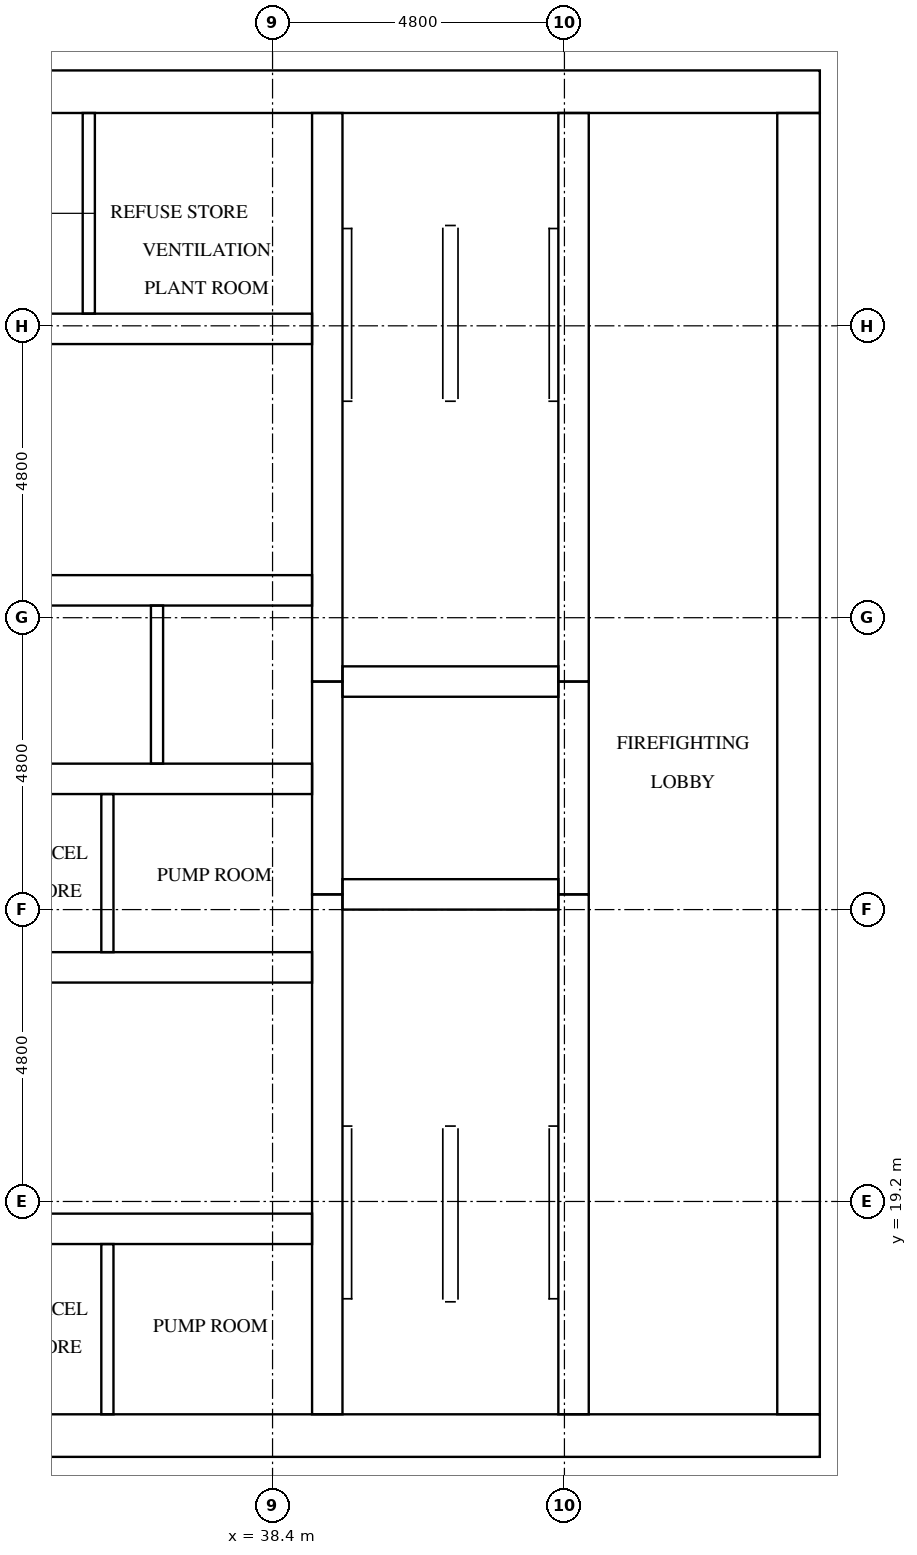
"""IFC4 building model, lengths in metres.
Left out: names, types, materials, properties, quantities, classifications, styles, units other than length and angle.
Written with IfcOpenShell. Run it as: python <this file> out.ifc"""

import sys

from ifc_helpers import new_model, si_unit, direction, frame, frame_2d, origin, place, context, subcontext, project, spatial, rectangle, extrude, element, fill, save


model = new_model("IFC4")
c1 = context("Model", 3, precision=1e-05, world=origin(), true_north=direction((0.0, 1.0)))
c2 = subcontext(c1, "Body", "Model", "MODEL_VIEW")
j1 = project(units=[si_unit("LENGTHUNIT", "METRE"), si_unit("PLANEANGLEUNIT", "RADIAN")], contexts=[c1])
p1 = place(None, origin())
s1 = spatial("IfcSite", under=j1, at=p1, CompositionType="ELEMENT")
p2 = place(p1, origin())
s2 = spatial("IfcBuilding", under=s1, at=p2, CompositionType="ELEMENT")
p3 = place(p2, frame((0.0, 0.0, 178.9)))
s3 = spatial("IfcBuildingStorey", under=s2, at=p3, CompositionType="ELEMENT", Elevation=178.9)
p4 = place(p3, frame((15.0, 15.35, 0.0), z_axis=(0.0, 0.0, 1.0), x_axis=(1.0, 0.0, 0.0)))
e1 = element("IfcWall", 1, at=p4, inside=s3, PredefinedType="SHEAR", context=c2, shape_type="SweptSolid", body=[
    extrude(rectangle(XDim=32.4, YDim=0.7, at=frame_2d((16.2, 0.0))), origin(), (0.0, 0.0, 1.0), 3.2),
])
p5 = place(p4, frame((15.3, 0.0, 0.0)))
e2 = element("IfcOpeningElement", 2, at=p5, cuts=e1, PredefinedType="OPENING", context=c2, shape_type="SweptSolid", body=[
    extrude(rectangle(XDim=1.8, YDim=2.1, at=frame_2d((0.9, 1.05))), frame((0.0, 0.36, 0.0), z_axis=(0.0, -1.0, 0.0), x_axis=(1.0, 0.0, 0.0)), (0.0, 0.0, 1.0), 0.72),
])
p6 = place(p3, frame((15.0, 37.45, 0.0), z_axis=(0.0, 0.0, 1.0), x_axis=(1.0, 0.0, 0.0)))
e3 = element("IfcWall", 3, at=p6, inside=s3, PredefinedType="SHEAR", context=c2, shape_type="SweptSolid", body=[
    extrude(rectangle(XDim=32.4, YDim=0.7, at=frame_2d((16.2, 0.0))), origin(), (0.0, 0.0, 1.0), 3.2),
])
p7 = place(p6, frame((15.3, 0.0, 0.0)))
e4 = element("IfcOpeningElement", 4, at=p7, cuts=e3, PredefinedType="OPENING", context=c2, shape_type="SweptSolid", body=[
    extrude(rectangle(XDim=1.8, YDim=2.1, at=frame_2d((0.9, 1.05))), frame((0.0, 0.36, 0.0), z_axis=(0.0, -1.0, 0.0), x_axis=(1.0, 0.0, 0.0)), (0.0, 0.0, 1.0), 0.72),
])
p8 = place(p6, frame((1.544, 0.0, 0.0)))
e5 = element("IfcOpeningElement", 5, at=p8, cuts=e3, PredefinedType="OPENING", context=c2, shape_type="SweptSolid", body=[
    extrude(rectangle(XDim=1.0, YDim=2.1, at=frame_2d((0.5, 1.05))), frame((0.0, 0.36, 0.0), z_axis=(0.0, -1.0, 0.0), x_axis=(1.0, 0.0, 0.0)), (0.0, 0.0, 1.0), 0.72),
])
p9 = place(p6, frame((5.219, 0.0, 0.0)))
e6 = element("IfcOpeningElement", 6, at=p9, cuts=e3, PredefinedType="OPENING", context=c2, shape_type="SweptSolid", body=[
    extrude(rectangle(XDim=1.0, YDim=2.1, at=frame_2d((0.5, 1.05))), frame((0.0, 0.36, 0.0), z_axis=(0.0, -1.0, 0.0), x_axis=(1.0, 0.0, 0.0)), (0.0, 0.0, 1.0), 0.72),
])
p10 = place(p3, frame((47.05, 15.7, 0.0), z_axis=(0.0, 0.0, 1.0), x_axis=(0.0, 1.0, 0.0)))
e7 = element("IfcWall", 7, at=p10, inside=s3, PredefinedType="SHEAR", context=c2, shape_type="SweptSolid", body=[
    extrude(rectangle(XDim=21.4, YDim=0.7, at=frame_2d((10.7, 0.0))), origin(), (0.0, 0.0, 1.0), 3.2),
])
p11 = place(p10, frame((10.4, 0.0, 0.0)))
e8 = element("IfcOpeningElement", 8, at=p11, cuts=e7, PredefinedType="OPENING", context=c2, shape_type="SweptSolid", body=[
    extrude(rectangle(XDim=1.2, YDim=2.1, at=frame_2d((0.6, 1.05))), frame((0.0, 0.36, 0.0), z_axis=(0.0, -1.0, 0.0), x_axis=(1.0, 0.0, 0.0)), (0.0, 0.0, 1.0), 0.72),
])
p12 = place(p3, frame((39.3, 15.7, 0.0), z_axis=(0.0, 0.0, 1.0), x_axis=(0.0, 1.0, 0.0)))
e9 = element("IfcWall", 9, at=p12, inside=s3, PredefinedType="SHEAR", context=c2, shape_type="SweptSolid", body=[
    extrude(rectangle(XDim=8.55, YDim=0.5, at=frame_2d((4.275, 0.0))), origin(), (0.0, 0.0, 1.0), 3.2),
])
p13 = place(p3, frame((39.3, 24.25, 0.0), z_axis=(0.0, 0.0, 1.0), x_axis=(0.0, 1.0, 0.0)))
e10 = element("IfcWall", 10, at=p13, inside=s3, PredefinedType="SHEAR", context=c2, shape_type="SweptSolid", body=[
    extrude(rectangle(XDim=3.5, YDim=0.5, at=frame_2d((1.75, 0.0))), origin(), (0.0, 0.0, 1.0), 3.2),
])
p14 = place(p3, frame((39.3, 27.75, 0.0), z_axis=(0.0, 0.0, 1.0), x_axis=(0.0, 1.0, 0.0)))
e11 = element("IfcWall", 11, at=p14, inside=s3, PredefinedType="SHEAR", context=c2, shape_type="SweptSolid", body=[
    extrude(rectangle(XDim=9.35, YDim=0.5, at=frame_2d((4.675, 0.0))), origin(), (0.0, 0.0, 1.0), 3.2),
])
p15 = place(p3, frame((43.35, 15.7, 0.0), z_axis=(0.0, 0.0, 1.0), x_axis=(0.0, 1.0, 0.0)))
e12 = element("IfcWall", 12, at=p15, inside=s3, PredefinedType="SHEAR", context=c2, shape_type="SweptSolid", body=[
    extrude(rectangle(XDim=8.55, YDim=0.5, at=frame_2d((4.275, 0.0))), origin(), (0.0, 0.0, 1.0), 3.2),
])
p16 = place(p15, frame((0.5, 0.0, 0.0)))
e13 = element("IfcOpeningElement", 13, at=p16, cuts=e12, PredefinedType="OPENING", context=c2, shape_type="SweptSolid", body=[
    extrude(rectangle(XDim=1.2, YDim=2.1, at=frame_2d((0.6, 1.05))), frame((0.0, 0.26, 0.0), z_axis=(0.0, -1.0, 0.0), x_axis=(1.0, 0.0, 0.0)), (0.0, 0.0, 1.0), 0.52),
])
p17 = place(p3, frame((43.35, 24.25, 0.0), z_axis=(0.0, 0.0, 1.0), x_axis=(0.0, 1.0, 0.0)))
e14 = element("IfcWall", 14, at=p17, inside=s3, PredefinedType="SHEAR", context=c2, shape_type="SweptSolid", body=[
    extrude(rectangle(XDim=3.5, YDim=0.5, at=frame_2d((1.75, 0.0))), origin(), (0.0, 0.0, 1.0), 3.2),
])
p18 = place(p17, frame((1.2, 0.0, 0.0)))
e15 = element("IfcOpeningElement", 15, at=p18, cuts=e14, PredefinedType="OPENING", context=c2, shape_type="SweptSolid", body=[
    extrude(rectangle(XDim=1.1, YDim=2.1, at=frame_2d((0.55, 1.05))), frame((0.0, 0.26, 0.0), z_axis=(0.0, -1.0, 0.0), x_axis=(1.0, 0.0, 0.0)), (0.0, 0.0, 1.0), 0.52),
])
p19 = place(p3, frame((43.35, 27.75, 0.0), z_axis=(0.0, 0.0, 1.0), x_axis=(0.0, 1.0, 0.0)))
e16 = element("IfcWall", 16, at=p19, inside=s3, PredefinedType="SHEAR", context=c2, shape_type="SweptSolid", body=[
    extrude(rectangle(XDim=9.35, YDim=0.5, at=frame_2d((4.675, 0.0))), origin(), (0.0, 0.0, 1.0), 3.2),
])
p20 = place(p19, frame((7.65, 0.0, 0.0)))
e17 = element("IfcOpeningElement", 17, at=p20, cuts=e16, PredefinedType="OPENING", context=c2, shape_type="SweptSolid", body=[
    extrude(rectangle(XDim=1.2, YDim=2.1, at=frame_2d((0.6, 1.05))), frame((0.0, 0.26, 0.0), z_axis=(0.0, -1.0, 0.0), x_axis=(1.0, 0.0, 0.0)), (0.0, 0.0, 1.0), 0.52),
])
for number, where, z_axis, x_axis in (
    (18, (39.55, 24.25, 0.0), (0.0, 0.0, 1.0), (1.0, 0.0, 0.0)),
    (19, (39.55, 27.75, 0.0), (0.0, 0.0, 1.0), (1.0, 0.0, 0.0)),
):
    element("IfcWall", number, at=place(p3, frame(where, z_axis=z_axis, x_axis=x_axis)), inside=s3, PredefinedType="SHEAR", context=c2, shape_type="SweptSolid", body=[
        extrude(rectangle(XDim=3.55, YDim=0.5, at=frame_2d((1.775, 0.0))), origin(), (0.0, 0.0, 1.0), 3.2),
    ])
p21 = place(p3, frame((33.45, 18.75, 0.0), z_axis=(0.0, 0.0, 1.0), x_axis=(1.0, 0.0, 0.0)))
e20 = element("IfcWall", 20, at=p21, inside=s3, PredefinedType="SHEAR", context=c2, shape_type="SweptSolid", body=[
    extrude(rectangle(XDim=5.6, YDim=0.5, at=frame_2d((2.8, 0.0))), origin(), (0.0, 0.0, 1.0), 3.2),
])
p22 = place(p21, frame((0.817, 0.0, 0.0)))
e21 = element("IfcOpeningElement", 21, at=p22, cuts=e20, PredefinedType="OPENING", context=c2, shape_type="SweptSolid", body=[
    extrude(rectangle(XDim=1.0, YDim=2.1, at=frame_2d((0.5, 1.05))), frame((0.0, 0.26, 0.0), z_axis=(0.0, -1.0, 0.0), x_axis=(1.0, 0.0, 0.0)), (0.0, 0.0, 1.0), 0.52),
])
p23 = place(p21, frame((3.467, 0.0, 0.0)))
e22 = element("IfcOpeningElement", 22, at=p23, cuts=e20, PredefinedType="OPENING", context=c2, shape_type="SweptSolid", body=[
    extrude(rectangle(XDim=1.0, YDim=2.1, at=frame_2d((0.5, 1.05))), frame((0.0, 0.26, 0.0), z_axis=(0.0, -1.0, 0.0), x_axis=(1.0, 0.0, 0.0)), (0.0, 0.0, 1.0), 0.52),
])
p24 = place(p3, frame((23.35, 23.05, 0.0), z_axis=(0.0, 0.0, 1.0), x_axis=(1.0, 0.0, 0.0)))
e23 = element("IfcWall", 23, at=p24, inside=s3, PredefinedType="SHEAR", context=c2, shape_type="SweptSolid", body=[
    extrude(rectangle(XDim=15.7, YDim=0.5, at=frame_2d((7.85, 0.0))), origin(), (0.0, 0.0, 1.0), 3.2),
])
p25 = place(p24, frame((0.317, 0.0, 0.0)))
e24 = element("IfcOpeningElement", 24, at=p25, cuts=e23, PredefinedType="OPENING", context=c2, shape_type="SweptSolid", body=[
    extrude(rectangle(XDim=1.0, YDim=2.1, at=frame_2d((0.5, 1.05))), frame((0.0, 0.26, 0.0), z_axis=(0.0, -1.0, 0.0), x_axis=(1.0, 0.0, 0.0)), (0.0, 0.0, 1.0), 0.52),
])
p26 = place(p24, frame((2.967, 0.0, 0.0)))
e25 = element("IfcOpeningElement", 25, at=p26, cuts=e23, PredefinedType="OPENING", context=c2, shape_type="SweptSolid", body=[
    extrude(rectangle(XDim=1.0, YDim=2.1, at=frame_2d((0.5, 1.05))), frame((0.0, 0.26, 0.0), z_axis=(0.0, -1.0, 0.0), x_axis=(1.0, 0.0, 0.0)), (0.0, 0.0, 1.0), 0.52),
])
p27 = place(p24, frame((10.917, 0.0, 0.0)))
e26 = element("IfcOpeningElement", 26, at=p27, cuts=e23, PredefinedType="OPENING", context=c2, shape_type="SweptSolid", body=[
    extrude(rectangle(XDim=1.0, YDim=2.1, at=frame_2d((0.5, 1.05))), frame((0.0, 0.26, 0.0), z_axis=(0.0, -1.0, 0.0), x_axis=(1.0, 0.0, 0.0)), (0.0, 0.0, 1.0), 0.52),
])
p28 = place(p24, frame((13.567, 0.0, 0.0)))
e27 = element("IfcOpeningElement", 27, at=p28, cuts=e23, PredefinedType="OPENING", context=c2, shape_type="SweptSolid", body=[
    extrude(rectangle(XDim=1.0, YDim=2.1, at=frame_2d((0.5, 1.05))), frame((0.0, 0.26, 0.0), z_axis=(0.0, -1.0, 0.0), x_axis=(1.0, 0.0, 0.0)), (0.0, 0.0, 1.0), 0.52),
])
p29 = place(p3, frame((23.35, 26.15, 0.0), z_axis=(0.0, 0.0, 1.0), x_axis=(1.0, 0.0, 0.0)))
e28 = element("IfcWall", 28, at=p29, inside=s3, PredefinedType="SHEAR", context=c2, shape_type="SweptSolid", body=[
    extrude(rectangle(XDim=15.7, YDim=0.5, at=frame_2d((7.85, 0.0))), origin(), (0.0, 0.0, 1.0), 3.2),
])
p30 = place(p3, frame((23.35, 29.25, 0.0), z_axis=(0.0, 0.0, 1.0), x_axis=(1.0, 0.0, 0.0)))
e29 = element("IfcWall", 29, at=p30, inside=s3, PredefinedType="SHEAR", context=c2, shape_type="SweptSolid", body=[
    extrude(rectangle(XDim=15.7, YDim=0.5, at=frame_2d((7.85, 0.0))), origin(), (0.0, 0.0, 1.0), 3.2),
])
p31 = place(p30, frame((0.675, 0.0, 0.0)))
e30 = element("IfcOpeningElement", 30, at=p31, cuts=e29, PredefinedType="OPENING", context=c2, shape_type="SweptSolid", body=[
    extrude(rectangle(XDim=1.1, YDim=2.1, at=frame_2d((0.55, 1.05))), frame((0.0, 0.26, 0.0), z_axis=(0.0, -1.0, 0.0), x_axis=(1.0, 0.0, 0.0)), (0.0, 0.0, 1.0), 0.52),
])
p32 = place(p30, frame((3.325, 0.0, 0.0)))
e31 = element("IfcOpeningElement", 31, at=p32, cuts=e29, PredefinedType="OPENING", context=c2, shape_type="SweptSolid", body=[
    extrude(rectangle(XDim=1.1, YDim=2.1, at=frame_2d((0.55, 1.05))), frame((0.0, 0.26, 0.0), z_axis=(0.0, -1.0, 0.0), x_axis=(1.0, 0.0, 0.0)), (0.0, 0.0, 1.0), 0.52),
])
p33 = place(p30, frame((5.975, 0.0, 0.0)))
e32 = element("IfcOpeningElement", 32, at=p33, cuts=e29, PredefinedType="OPENING", context=c2, shape_type="SweptSolid", body=[
    extrude(rectangle(XDim=1.1, YDim=2.1, at=frame_2d((0.55, 1.05))), frame((0.0, 0.26, 0.0), z_axis=(0.0, -1.0, 0.0), x_axis=(1.0, 0.0, 0.0)), (0.0, 0.0, 1.0), 0.52),
])
p34 = place(p30, frame((8.625, 0.0, 0.0)))
e33 = element("IfcOpeningElement", 33, at=p34, cuts=e29, PredefinedType="OPENING", context=c2, shape_type="SweptSolid", body=[
    extrude(rectangle(XDim=1.1, YDim=2.1, at=frame_2d((0.55, 1.05))), frame((0.0, 0.26, 0.0), z_axis=(0.0, -1.0, 0.0), x_axis=(1.0, 0.0, 0.0)), (0.0, 0.0, 1.0), 0.52),
])
p35 = place(p30, frame((11.275, 0.0, 0.0)))
e34 = element("IfcOpeningElement", 34, at=p35, cuts=e29, PredefinedType="OPENING", context=c2, shape_type="SweptSolid", body=[
    extrude(rectangle(XDim=1.1, YDim=2.1, at=frame_2d((0.55, 1.05))), frame((0.0, 0.26, 0.0), z_axis=(0.0, -1.0, 0.0), x_axis=(1.0, 0.0, 0.0)), (0.0, 0.0, 1.0), 0.52),
])
p36 = place(p30, frame((13.925, 0.0, 0.0)))
e35 = element("IfcOpeningElement", 35, at=p36, cuts=e29, PredefinedType="OPENING", context=c2, shape_type="SweptSolid", body=[
    extrude(rectangle(XDim=1.1, YDim=2.1, at=frame_2d((0.55, 1.05))), frame((0.0, 0.26, 0.0), z_axis=(0.0, -1.0, 0.0), x_axis=(1.0, 0.0, 0.0)), (0.0, 0.0, 1.0), 0.52),
])
p37 = place(p3, frame((33.45, 33.55, 0.0), z_axis=(0.0, 0.0, 1.0), x_axis=(1.0, 0.0, 0.0)))
e36 = element("IfcWall", 36, at=p37, inside=s3, PredefinedType="SHEAR", context=c2, shape_type="SweptSolid", body=[
    extrude(rectangle(XDim=5.6, YDim=0.5, at=frame_2d((2.8, 0.0))), origin(), (0.0, 0.0, 1.0), 3.2),
])
p38 = place(p37, frame((0.664, 0.0, 0.0)))
e37 = element("IfcOpeningElement", 37, at=p38, cuts=e36, PredefinedType="OPENING", context=c2, shape_type="SweptSolid", body=[
    extrude(rectangle(XDim=1.0, YDim=2.1, at=frame_2d((0.5, 1.05))), frame((0.0, 0.26, 0.0), z_axis=(0.0, -1.0, 0.0), x_axis=(1.0, 0.0, 0.0)), (0.0, 0.0, 1.0), 0.52),
])
p39 = place(p37, frame((3.314, 0.0, 0.0)))
e38 = element("IfcOpeningElement", 38, at=p39, cuts=e36, PredefinedType="OPENING", context=c2, shape_type="SweptSolid", body=[
    extrude(rectangle(XDim=1.0, YDim=2.1, at=frame_2d((0.5, 1.05))), frame((0.0, 0.26, 0.0), z_axis=(0.0, -1.0, 0.0), x_axis=(1.0, 0.0, 0.0)), (0.0, 0.0, 1.0), 0.52),
])
p40 = place(p3, frame((36.5, 26.4, 0.0), z_axis=(0.0, 0.0, 1.0), x_axis=(0.0, 1.0, 0.0)))
e39 = element("IfcWall", 39, at=p40, inside=s3, PredefinedType="SOLIDWALL", context=c2, shape_type="SweptSolid", body=[
    extrude(rectangle(XDim=2.6, YDim=0.2, at=frame_2d((1.3, 0.0))), origin(), (0.0, 0.0, 1.0), 3.2),
])
p41 = place(p3, frame((35.684, 23.3, 0.0), z_axis=(0.0, 0.0, 1.0), x_axis=(0.0, 1.0, 0.0)))
e40 = element("IfcWall", 40, at=p41, inside=s3, PredefinedType="PARTITIONING", context=c2, shape_type="SweptSolid", body=[
    extrude(rectangle(XDim=2.6, YDim=0.2, at=frame_2d((1.3, 0.0))), origin(), (0.0, 0.0, 1.0), 3.2),
])
p42 = place(p3, frame((35.684, 15.7, 0.0), z_axis=(0.0, 0.0, 1.0), x_axis=(0.0, 1.0, 0.0)))
e41 = element("IfcWall", 41, at=p42, inside=s3, PredefinedType="PARTITIONING", context=c2, shape_type="SweptSolid", body=[
    extrude(rectangle(XDim=2.8, YDim=0.2, at=frame_2d((1.4, 0.0))), origin(), (0.0, 0.0, 1.0), 3.2),
])
p43 = place(p3, frame((35.378, 33.8, 0.0), z_axis=(0.0, 0.0, 1.0), x_axis=(0.0, 1.0, 0.0)))
e42 = element("IfcWall", 42, at=p43, inside=s3, PredefinedType="PARTITIONING", context=c2, shape_type="SweptSolid", body=[
    extrude(rectangle(XDim=3.3, YDim=0.2, at=frame_2d((1.65, 0.0))), origin(), (0.0, 0.0, 1.0), 3.2),
])
p44 = place(p35, origin())
e43 = element("IfcDoor", 43, at=p44, inside=s3, OperationType="DOUBLE_DOOR_SLIDING", PredefinedType="DOOR", context=c2, shape_type="SweptSolid", body=[
    extrude(rectangle(XDim=1.1, YDim=2.1, at=frame_2d((0.55, 1.05))), frame((0.0, 0.025, 0.0), z_axis=(0.0, -1.0, 0.0), x_axis=(1.0, 0.0, 0.0)), (0.0, 0.0, 1.0), 0.05),
])
fill(e34, e43)
p45 = place(p36, origin())
e44 = element("IfcDoor", 44, at=p45, inside=s3, OperationType="DOUBLE_DOOR_SLIDING", PredefinedType="DOOR", context=c2, shape_type="SweptSolid", body=[
    extrude(rectangle(XDim=1.1, YDim=2.1, at=frame_2d((0.55, 1.05))), frame((0.0, 0.025, 0.0), z_axis=(0.0, -1.0, 0.0), x_axis=(1.0, 0.0, 0.0)), (0.0, 0.0, 1.0), 0.05),
])
fill(e35, e44)
p46 = place(p18, origin())
e45 = element("IfcDoor", 45, at=p46, inside=s3, OperationType="DOUBLE_DOOR_SLIDING", PredefinedType="DOOR", context=c2, shape_type="SweptSolid", body=[
    extrude(rectangle(XDim=1.1, YDim=2.1, at=frame_2d((0.55, 1.05))), frame((0.0, 0.025, 0.0), z_axis=(0.0, -1.0, 0.0), x_axis=(1.0, 0.0, 0.0)), (0.0, 0.0, 1.0), 0.05),
])
fill(e15, e45)
p47 = place(p16, origin())
e46 = element("IfcDoor", 46, at=p47, inside=s3, OperationType="SINGLE_SWING_LEFT", PredefinedType="DOOR", context=c2, shape_type="SweptSolid", body=[
    extrude(rectangle(XDim=1.2, YDim=2.1, at=frame_2d((0.6, 1.05))), frame((0.0, 0.025, 0.0), z_axis=(0.0, -1.0, 0.0), x_axis=(1.0, 0.0, 0.0)), (0.0, 0.0, 1.0), 0.05),
])
fill(e13, e46)
p48 = place(p20, origin())
e47 = element("IfcDoor", 47, at=p48, inside=s3, OperationType="SINGLE_SWING_RIGHT", PredefinedType="DOOR", context=c2, shape_type="SweptSolid", body=[
    extrude(rectangle(XDim=1.2, YDim=2.1, at=frame_2d((0.6, 1.05))), frame((0.0, 0.025, 0.0), z_axis=(0.0, -1.0, 0.0), x_axis=(1.0, 0.0, 0.0)), (0.0, 0.0, 1.0), 0.05),
])
fill(e17, e47)
p49 = place(p11, origin())
e48 = element("IfcDoor", 48, at=p49, inside=s3, OperationType="SINGLE_SWING_RIGHT", PredefinedType="DOOR", context=c2, shape_type="SweptSolid", body=[
    extrude(rectangle(XDim=1.2, YDim=2.1, at=frame_2d((0.6, 1.05))), frame((0.0, 0.025, 0.0), z_axis=(0.0, -1.0, 0.0), x_axis=(1.0, 0.0, 0.0)), (0.0, 0.0, 1.0), 0.05),
])
fill(e8, e48)
p50 = place(p27, frame((1.0, 0.0, 0.0), z_axis=(0.0, 0.0, 1.0), x_axis=(-1.0, 0.0, 0.0)))
e49 = element("IfcDoor", 49, at=p50, inside=s3, OperationType="SINGLE_SWING_LEFT", PredefinedType="DOOR", context=c2, shape_type="SweptSolid", body=[
    extrude(rectangle(XDim=1.0, YDim=2.1, at=frame_2d((0.5, 1.05))), frame((0.0, 0.025, 0.0), z_axis=(0.0, -1.0, 0.0), x_axis=(1.0, 0.0, 0.0)), (0.0, 0.0, 1.0), 0.05),
])
fill(e26, e49)
p51 = place(p28, frame((1.0, 0.0, 0.0), z_axis=(0.0, 0.0, 1.0), x_axis=(-1.0, 0.0, 0.0)))
e50 = element("IfcDoor", 50, at=p51, inside=s3, OperationType="SINGLE_SWING_RIGHT", PredefinedType="DOOR", context=c2, shape_type="SweptSolid", body=[
    extrude(rectangle(XDim=1.0, YDim=2.1, at=frame_2d((0.5, 1.05))), frame((0.0, 0.025, 0.0), z_axis=(0.0, -1.0, 0.0), x_axis=(1.0, 0.0, 0.0)), (0.0, 0.0, 1.0), 0.05),
])
fill(e27, e50)
p52 = place(p22, origin())
e51 = element("IfcDoor", 51, at=p52, inside=s3, OperationType="SINGLE_SWING_LEFT", PredefinedType="DOOR", context=c2, shape_type="SweptSolid", body=[
    extrude(rectangle(XDim=1.0, YDim=2.1, at=frame_2d((0.5, 1.05))), frame((0.0, 0.025, 0.0), z_axis=(0.0, -1.0, 0.0), x_axis=(1.0, 0.0, 0.0)), (0.0, 0.0, 1.0), 0.05),
])
fill(e21, e51)
p53 = place(p23, origin())
e52 = element("IfcDoor", 52, at=p53, inside=s3, OperationType="SINGLE_SWING_RIGHT", PredefinedType="DOOR", context=c2, shape_type="SweptSolid", body=[
    extrude(rectangle(XDim=1.0, YDim=2.1, at=frame_2d((0.5, 1.05))), frame((0.0, 0.025, 0.0), z_axis=(0.0, -1.0, 0.0), x_axis=(1.0, 0.0, 0.0)), (0.0, 0.0, 1.0), 0.05),
])
fill(e22, e52)
p54 = place(p38, frame((1.0, 0.0, 0.0), z_axis=(0.0, 0.0, 1.0), x_axis=(-1.0, 0.0, 0.0)))
e53 = element("IfcDoor", 53, at=p54, inside=s3, OperationType="SINGLE_SWING_LEFT", PredefinedType="DOOR", context=c2, shape_type="SweptSolid", body=[
    extrude(rectangle(XDim=1.0, YDim=2.1, at=frame_2d((0.5, 1.05))), frame((0.0, 0.025, 0.0), z_axis=(0.0, -1.0, 0.0), x_axis=(1.0, 0.0, 0.0)), (0.0, 0.0, 1.0), 0.05),
])
fill(e37, e53)
p55 = place(p39, frame((1.0, 0.0, 0.0), z_axis=(0.0, 0.0, 1.0), x_axis=(-1.0, 0.0, 0.0)))
e54 = element("IfcDoor", 54, at=p55, inside=s3, OperationType="SINGLE_SWING_RIGHT", PredefinedType="DOOR", context=c2, shape_type="SweptSolid", body=[
    extrude(rectangle(XDim=1.0, YDim=2.1, at=frame_2d((0.5, 1.05))), frame((0.0, 0.025, 0.0), z_axis=(0.0, -1.0, 0.0), x_axis=(1.0, 0.0, 0.0)), (0.0, 0.0, 1.0), 0.05),
])
fill(e38, e54)
save(model, sys.argv[1])
